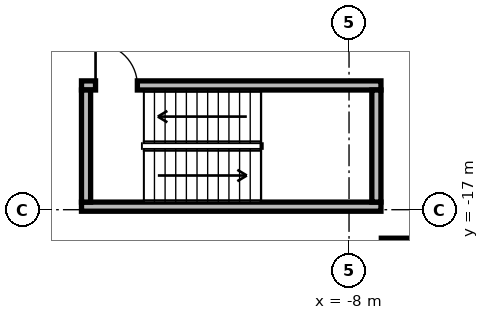
"""IFC4 building model, lengths in metres.
Left out: names, types, materials, properties, quantities, classifications, styles, units other than length and angle.
Written with IfcOpenShell. Run it as: python <this file> out.ifc"""

import sys

from ifc_helpers import new_model, si_unit, direction, frame, frame_2d, origin, origin_2d, place, context, subcontext, project, spatial, rectangle, extrude, source, transform, mapped, element, fill, save


model = new_model("IFC4")
c1 = context("Model", 3, precision=1e-05, world=origin(), true_north=direction((0.0, 1.0)))
c2 = subcontext(c1, "Body", "Model", "MODEL_VIEW")
j1 = project(units=[si_unit("LENGTHUNIT", "METRE"), si_unit("PLANEANGLEUNIT", "RADIAN")], contexts=[c1])
p1 = place(None, origin())
s1 = spatial("IfcSite", under=j1, at=p1, CompositionType="ELEMENT")
p2 = place(p1, origin())
s2 = spatial("IfcBuilding", under=s1, at=p2, CompositionType="ELEMENT")
p3 = place(p2, frame((0.0, 0.0, -8.4)))
s3 = spatial("IfcBuildingStorey", under=s2, at=p3, CompositionType="ELEMENT", Elevation=-8.4)
m1 = source(origin(), c2, "Body", "SweptSolid", [
    extrude(rectangle(XDim=1.3, YDim=1.3, at=origin_2d()), origin(), (0.0, 0.0, 1.0), 4.2),
])
p4 = place(p3, frame((-6.5, -18.4, 0.0), z_axis=(0.0, 0.0, 1.0), x_axis=(1.0, 0.0, 0.0)))
e1 = element("IfcColumn", 1, at=p4, inside=s3, PredefinedType="COLUMN", context=c2, shape_type="MappedRepresentation", body=[
    mapped(m1, transform((0.0, 0.0, 0.0), x_axis=(1.0, 0.0, 0.0), y_axis=(0.0, 1.0, 0.0), z_axis=(0.0, 0.0, 1.0), scale=1.0)),
])
m2 = source(origin(), c2, "Body", "SweptSolid", [
    extrude(rectangle(XDim=7.88, YDim=0.24, at=frame_2d((3.94, 0.0))), origin(), (0.0, 0.0, 1.0), 3.88),
])
p5 = place(p3, frame((-15.04, -13.73, 0.0), z_axis=(0.0, 0.0, 1.0), x_axis=(1.0, 0.0, 0.0)))
e2 = element("IfcWall", 2, at=p5, inside=s3, PredefinedType="PARTITIONING", context=c2, shape_type="MappedRepresentation", body=[
    mapped(m2, transform((0.0, 0.0, 0.0), x_axis=(1.0, 0.0, 0.0), y_axis=(0.0, 1.0, 0.0), z_axis=(0.0, 0.0, 1.0), scale=1.0)),
])
p6 = place(p5, frame((0.37, 0.0, 0.0)))
e3 = element("IfcOpeningElement", 3, at=p6, cuts=e2, PredefinedType="OPENING", context=c2, shape_type="SweptSolid", body=[
    extrude(rectangle(XDim=1.1, YDim=2.15, at=frame_2d((0.55, 1.075))), frame((0.0, 0.13, 0.0), z_axis=(0.0, -1.0, 0.0), x_axis=(1.0, 0.0, 0.0)), (0.0, 0.0, 1.0), 0.26),
])
p7 = place(p3, frame((-15.04, -16.92, 0.0), z_axis=(0.0, 0.0, 1.0), x_axis=(1.0, 0.0, 0.0)))
e4 = element("IfcWall", 4, at=p7, inside=s3, PredefinedType="PARTITIONING", context=c2, shape_type="MappedRepresentation", body=[
    mapped(m2, transform((0.0, 0.0, 0.0), x_axis=(1.0, 0.0, 0.0), y_axis=(0.0, 1.0, 0.0), z_axis=(0.0, 0.0, 1.0), scale=1.0)),
])
m3 = source(origin(), c2, "Body", "SweptSolid", [
    extrude(rectangle(XDim=2.95, YDim=0.24, at=frame_2d((1.475, 0.0))), origin(), (0.0, 0.0, 1.0), 3.88),
])
for number, where, z_axis, x_axis in (
    (5, (-14.92, -16.8, 0.0), (0.0, 0.0, 1.0), (0.0, 1.0, 0.0)),
    (6, (-7.28, -16.8, 0.0), (0.0, 0.0, 1.0), (0.0, 1.0, 0.0)),
):
    element("IfcWall", number, at=place(p3, frame(where, z_axis=z_axis, x_axis=x_axis)), inside=s3, PredefinedType="PARTITIONING", context=c2, shape_type="MappedRepresentation", body=[
        mapped(m3, transform((0.0, 0.0, 0.0), x_axis=(1.0, 0.0, 0.0), y_axis=(0.0, 1.0, 0.0), z_axis=(0.0, 0.0, 1.0), scale=1.0)),
    ])
m4 = source(origin(), c2, "Body", "SweptSolid", [
    extrude(rectangle(XDim=1.1, YDim=2.15, at=frame_2d((0.55, 1.075))), frame((0.0, 0.025, 0.0), z_axis=(0.0, -1.0, 0.0), x_axis=(1.0, 0.0, 0.0)), (0.0, 0.0, 1.0), 0.05),
])
p8 = place(p6, origin())
e7 = element("IfcDoor", 7, at=p8, inside=s3, OperationType="SINGLE_SWING_LEFT", PredefinedType="DOOR", context=c2, shape_type="MappedRepresentation", body=[
    mapped(m4, transform((0.0, 0.0, 0.0), x_axis=(1.0, 0.0, 0.0), y_axis=(0.0, 1.0, 0.0), z_axis=(0.0, 0.0, 1.0), scale=1.0)),
])
fill(e3, e7)
save(model, sys.argv[1])
